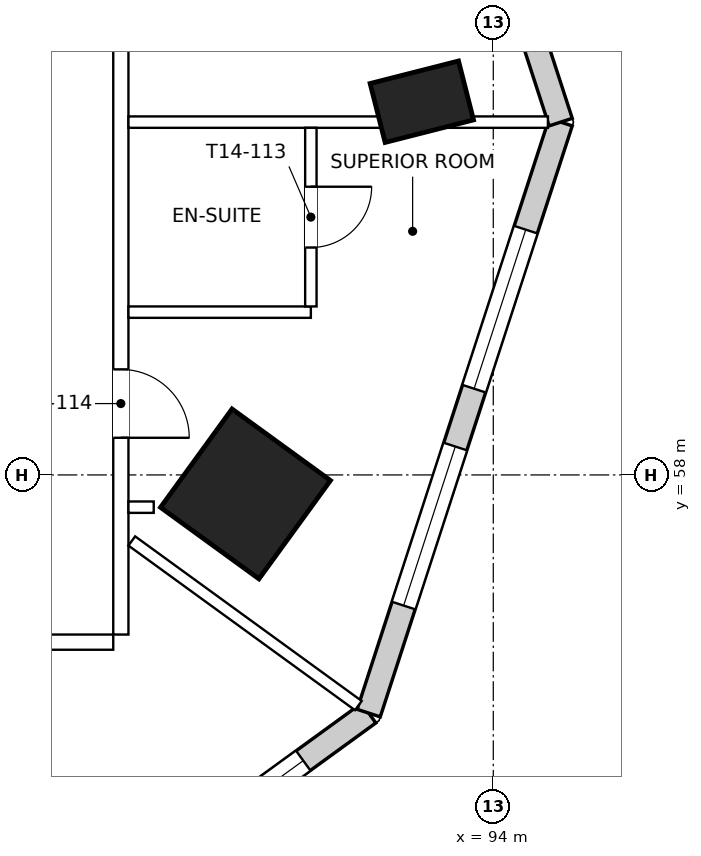
"""IFC4 building model, lengths in metres.
Left out: names, types, materials, properties, quantities, classifications, styles, units other than length and angle.
Written with IfcOpenShell. Run it as: python <this file> out.ifc"""

import sys

from ifc_helpers import new_model, si_unit, direction, frame, frame_2d, origin, origin_2d, place, context, subcontext, project, spatial, rectangle, extrude, element, fill, save


model = new_model("IFC4")
c1 = context("Model", 3, precision=1e-05, world=origin(), true_north=direction((0.0, 1.0)))
c2 = subcontext(c1, "Body", "Model", "MODEL_VIEW")
j1 = project(units=[si_unit("LENGTHUNIT", "METRE"), si_unit("PLANEANGLEUNIT", "RADIAN")], contexts=[c1])
p1 = place(None, origin())
s1 = spatial("IfcSite", under=j1, at=p1, CompositionType="ELEMENT")
p2 = place(p1, origin())
s2 = spatial("IfcBuilding", under=s1, at=p2, CompositionType="ELEMENT")
p3 = place(p2, frame((0.0, 0.0, 204.3)))
s3 = spatial("IfcBuildingStorey", under=s2, at=p3, CompositionType="ELEMENT", Elevation=204.3)
p4 = place(p3, frame((90.74, 57.75, 0.0), z_axis=(0.0, 0.0, 1.0), x_axis=(0.809016994375, -0.587785252292, 0.0)))
e1 = element("IfcColumn", 1, at=p4, inside=s3, PredefinedType="COLUMN", context=c2, shape_type="SweptSolid", body=[
    extrude(rectangle(XDim=1.6, YDim=1.6, at=origin_2d()), origin(), (0.0, 0.0, 1.0), 3.9),
])
p5 = place(p3, frame((93.06, 62.91, 0.0), z_axis=(0.0, 0.0, 1.0), x_axis=(0.246880623275, -0.969045900797, 0.0)))
e2 = element("IfcColumn", 2, at=p5, inside=s3, PredefinedType="COLUMN", context=c2, shape_type="SweptSolid", body=[
    extrude(rectangle(XDim=0.8, YDim=1.2, at=origin_2d()), origin(), (0.0, 0.0, 1.0), 3.9),
])
p6 = place(p3, frame((74.378, 41.801, 0.0), z_axis=(0.0, 0.0, 1.0), x_axis=(0.809017634756, 0.587784370883, 0.0)))
e3 = element("IfcWall", 3, at=p6, inside=s3, PredefinedType="SOLIDWALL", context=c2, shape_type="SweptSolid", body=[
    extrude(rectangle(XDim=22.229, YDim=0.32, at=frame_2d((11.114, 0.0))), origin(), (0.0, 0.0, 1.0), 3.6),
])
p7 = place(p6, frame((1.064, 0.0, 0.75)))
e4 = element("IfcOpeningElement", 4, at=p7, cuts=e3, PredefinedType="OPENING", context=c2, shape_type="SweptSolid", body=[
    extrude(rectangle(XDim=2.1, YDim=2.1, at=frame_2d((1.05, 1.05))), frame((0.0, 0.17, 0.0), z_axis=(0.0, -1.0, 0.0), x_axis=(1.0, 0.0, 0.0)), (0.0, 0.0, 1.0), 0.34),
])
p8 = place(p6, frame((4.064, 0.0, 0.75)))
e5 = element("IfcOpeningElement", 5, at=p8, cuts=e3, PredefinedType="OPENING", context=c2, shape_type="SweptSolid", body=[
    extrude(rectangle(XDim=2.1, YDim=2.1, at=frame_2d((1.05, 1.05))), frame((0.0, 0.17, 0.0), z_axis=(0.0, -1.0, 0.0), x_axis=(1.0, 0.0, 0.0)), (0.0, 0.0, 1.0), 0.34),
])
p9 = place(p6, frame((7.064, 0.0, 0.75)))
e6 = element("IfcOpeningElement", 6, at=p9, cuts=e3, PredefinedType="OPENING", context=c2, shape_type="SweptSolid", body=[
    extrude(rectangle(XDim=2.1, YDim=2.1, at=frame_2d((1.05, 1.05))), frame((0.0, 0.17, 0.0), z_axis=(0.0, -1.0, 0.0), x_axis=(1.0, 0.0, 0.0)), (0.0, 0.0, 1.0), 0.34),
])
p10 = place(p6, frame((10.064, 0.0, 0.75)))
e7 = element("IfcOpeningElement", 7, at=p10, cuts=e3, PredefinedType="OPENING", context=c2, shape_type="SweptSolid", body=[
    extrude(rectangle(XDim=2.1, YDim=2.1, at=frame_2d((1.05, 1.05))), frame((0.0, 0.17, 0.0), z_axis=(0.0, -1.0, 0.0), x_axis=(1.0, 0.0, 0.0)), (0.0, 0.0, 1.0), 0.34),
])
p11 = place(p6, frame((13.064, 0.0, 0.75)))
e8 = element("IfcOpeningElement", 8, at=p11, cuts=e3, PredefinedType="OPENING", context=c2, shape_type="SweptSolid", body=[
    extrude(rectangle(XDim=2.1, YDim=2.1, at=frame_2d((1.05, 1.05))), frame((0.0, 0.17, 0.0), z_axis=(0.0, -1.0, 0.0), x_axis=(1.0, 0.0, 0.0)), (0.0, 0.0, 1.0), 0.34),
])
p12 = place(p6, frame((16.064, 0.0, 0.75)))
e9 = element("IfcOpeningElement", 9, at=p12, cuts=e3, PredefinedType="OPENING", context=c2, shape_type="SweptSolid", body=[
    extrude(rectangle(XDim=2.1, YDim=2.1, at=frame_2d((1.05, 1.05))), frame((0.0, 0.17, 0.0), z_axis=(0.0, -1.0, 0.0), x_axis=(1.0, 0.0, 0.0)), (0.0, 0.0, 1.0), 0.34),
])
p13 = place(p6, frame((19.064, 0.0, 0.75)))
e10 = element("IfcOpeningElement", 10, at=p13, cuts=e3, PredefinedType="OPENING", context=c2, shape_type="SweptSolid", body=[
    extrude(rectangle(XDim=2.1, YDim=2.1, at=frame_2d((1.05, 1.05))), frame((0.0, 0.17, 0.0), z_axis=(0.0, -1.0, 0.0), x_axis=(1.0, 0.0, 0.0)), (0.0, 0.0, 1.0), 0.34),
])
p14 = place(p3, frame((92.361, 54.867, 0.0), z_axis=(0.0, 0.0, 1.0), x_axis=(0.309006387978, 0.951059962457, 0.0)))
e11 = element("IfcWall", 11, at=p14, inside=s3, PredefinedType="SOLIDWALL", context=c2, shape_type="SweptSolid", body=[
    extrude(rectangle(XDim=8.175, YDim=0.32, at=frame_2d((4.087, 0.0))), origin(), (0.0, 0.0, 1.0), 3.6),
])
p15 = place(p14, frame((1.488, 0.0, 0.75)))
e12 = element("IfcOpeningElement", 12, at=p15, cuts=e11, PredefinedType="OPENING", context=c2, shape_type="SweptSolid", body=[
    extrude(rectangle(XDim=2.2, YDim=2.1, at=frame_2d((1.1, 1.05))), frame((0.0, 0.17, 0.0), z_axis=(0.0, -1.0, 0.0), x_axis=(1.0, 0.0, 0.0)), (0.0, 0.0, 1.0), 0.34),
])
p16 = place(p14, frame((4.488, 0.0, 0.75)))
e13 = element("IfcOpeningElement", 13, at=p16, cuts=e11, PredefinedType="OPENING", context=c2, shape_type="SweptSolid", body=[
    extrude(rectangle(XDim=2.2, YDim=2.1, at=frame_2d((1.1, 1.05))), frame((0.0, 0.17, 0.0), z_axis=(0.0, -1.0, 0.0), x_axis=(1.0, 0.0, 0.0)), (0.0, 0.0, 1.0), 0.34),
])
p17 = place(p3, frame((94.887, 62.642, 0.0), z_axis=(0.0, 0.0, 1.0), x_axis=(-0.309019087741, 0.951055836117, 0.0)))
e14 = element("IfcWall", 14, at=p17, inside=s3, PredefinedType="SOLIDWALL", context=c2, shape_type="SweptSolid", body=[
    extrude(rectangle(XDim=21.18, YDim=0.32, at=frame_2d((10.59, 0.0))), origin(), (0.0, 0.0, 1.0), 3.6),
])
p18 = place(p17, frame((2.04, 0.0, 0.75)))
e15 = element("IfcOpeningElement", 15, at=p18, cuts=e14, PredefinedType="OPENING", context=c2, shape_type="SweptSolid", body=[
    extrude(rectangle(XDim=2.1, YDim=2.1, at=frame_2d((1.05, 1.05))), frame((0.0, 0.17, 0.0), z_axis=(0.0, -1.0, 0.0), x_axis=(1.0, 0.0, 0.0)), (0.0, 0.0, 1.0), 0.34),
])
p19 = place(p17, frame((5.04, 0.0, 0.75)))
e16 = element("IfcOpeningElement", 16, at=p19, cuts=e14, PredefinedType="OPENING", context=c2, shape_type="SweptSolid", body=[
    extrude(rectangle(XDim=2.1, YDim=2.1, at=frame_2d((1.05, 1.05))), frame((0.0, 0.17, 0.0), z_axis=(0.0, -1.0, 0.0), x_axis=(1.0, 0.0, 0.0)), (0.0, 0.0, 1.0), 0.34),
])
p20 = place(p17, frame((8.14, 0.0, 0.75)))
e17 = element("IfcOpeningElement", 17, at=p20, cuts=e14, PredefinedType="OPENING", context=c2, shape_type="SweptSolid", body=[
    extrude(rectangle(XDim=2.1, YDim=2.1, at=frame_2d((1.05, 1.05))), frame((0.0, 0.17, 0.0), z_axis=(0.0, -1.0, 0.0), x_axis=(1.0, 0.0, 0.0)), (0.0, 0.0, 1.0), 0.34),
])
p21 = place(p17, frame((11.19, 0.0, 0.9)))
e18 = element("IfcOpeningElement", 18, at=p21, cuts=e14, PredefinedType="OPENING", context=c2, shape_type="SweptSolid", body=[
    extrude(rectangle(XDim=1.6, YDim=1.8, at=frame_2d((0.8, 0.9))), frame((0.0, 0.17, 0.0), z_axis=(0.0, -1.0, 0.0), x_axis=(1.0, 0.0, 0.0)), (0.0, 0.0, 1.0), 0.34),
])
p22 = place(p17, frame((14.04, 0.0, 0.75)))
e19 = element("IfcOpeningElement", 19, at=p22, cuts=e14, PredefinedType="OPENING", context=c2, shape_type="SweptSolid", body=[
    extrude(rectangle(XDim=2.1, YDim=2.1, at=frame_2d((1.05, 1.05))), frame((0.0, 0.17, 0.0), z_axis=(0.0, -1.0, 0.0), x_axis=(1.0, 0.0, 0.0)), (0.0, 0.0, 1.0), 0.34),
])
p23 = place(p17, frame((17.04, 0.0, 0.75)))
e20 = element("IfcOpeningElement", 20, at=p23, cuts=e14, PredefinedType="OPENING", context=c2, shape_type="SweptSolid", body=[
    extrude(rectangle(XDim=2.1, YDim=2.1, at=frame_2d((1.05, 1.05))), frame((0.0, 0.17, 0.0), z_axis=(0.0, -1.0, 0.0), x_axis=(1.0, 0.0, 0.0)), (0.0, 0.0, 1.0), 0.34),
])
p24 = place(p3, frame((89.1, 63.85, 0.0), z_axis=(0.0, 0.0, 1.0), x_axis=(0.0, -1.0, 0.0)))
e21 = element("IfcWall", 21, at=p24, inside=s3, PredefinedType="PARTITIONING", context=c2, shape_type="SweptSolid", body=[
    extrude(rectangle(XDim=7.95, YDim=0.2, at=frame_2d((3.975, 0.0))), origin(), (0.0, 0.0, 1.0), 2.9),
])
p25 = place(p24, frame((4.461, 0.0, 0.0)))
e22 = element("IfcOpeningElement", 22, at=p25, cuts=e21, PredefinedType="OPENING", context=c2, shape_type="SweptSolid", body=[
    extrude(rectangle(XDim=0.9, YDim=2.1, at=frame_2d((0.45, 1.05))), frame((0.0, 0.11, 0.0), z_axis=(0.0, -1.0, 0.0), x_axis=(1.0, 0.0, 0.0)), (0.0, 0.0, 1.0), 0.22),
])
p26 = place(p3, frame((89.0, 55.8, 0.0), z_axis=(0.0, 0.0, 1.0), x_axis=(-1.0, 0.0, 0.0)))
e23 = element("IfcWall", 23, at=p26, inside=s3, PredefinedType="PARTITIONING", context=c2, shape_type="SweptSolid", body=[
    extrude(rectangle(XDim=11.382, YDim=0.2, at=frame_2d((5.691, 0.0))), origin(), (0.0, 0.0, 1.0), 2.9),
])
p27 = place(p26, frame((9.204, 0.0, 0.0)))
e24 = element("IfcOpeningElement", 24, at=p27, cuts=e23, PredefinedType="OPENING", context=c2, shape_type="SweptSolid", body=[
    extrude(rectangle(XDim=0.9, YDim=2.1, at=frame_2d((0.45, 1.05))), frame((0.0, 0.11, 0.0), z_axis=(0.0, -1.0, 0.0), x_axis=(1.0, 0.0, 0.0)), (0.0, 0.0, 1.0), 0.22),
])
p28 = place(p26, frame((3.546, 0.0, 0.0)))
e25 = element("IfcOpeningElement", 25, at=p28, cuts=e23, PredefinedType="OPENING", context=c2, shape_type="SweptSolid", body=[
    extrude(rectangle(XDim=0.9, YDim=2.1, at=frame_2d((0.45, 1.05))), frame((0.0, 0.11, 0.0), z_axis=(0.0, -1.0, 0.0), x_axis=(1.0, 0.0, 0.0)), (0.0, 0.0, 1.0), 0.22),
])
p29 = place(p3, frame((92.225, 54.966, 0.0), z_axis=(0.0, 0.0, 1.0), x_axis=(-0.809028266422, 0.587769737338, 0.0)))
e26 = element("IfcWall", 26, at=p29, inside=s3, PredefinedType="PARTITIONING", context=c2, shape_type="SweptSolid", body=[
    extrude(rectangle(XDim=3.684, YDim=0.15, at=frame_2d((1.842, 0.0))), origin(), (0.0, 0.0, 1.0), 2.9),
])
p30 = place(p3, frame((94.719, 62.642, 0.0), z_axis=(0.0, 0.0, 1.0), x_axis=(-1.0, 0.0, 0.0)))
e27 = element("IfcWall", 27, at=p30, inside=s3, PredefinedType="PARTITIONING", context=c2, shape_type="SweptSolid", body=[
    extrude(rectangle(XDim=5.519, YDim=0.15, at=frame_2d((2.76, 0.0))), origin(), (0.0, 0.0, 1.0), 3.6),
])
p31 = place(p3, frame((89.2, 60.142, 0.0), z_axis=(0.0, 0.0, 1.0), x_axis=(1.0, 0.0, 0.0)))
e28 = element("IfcWall", 28, at=p31, inside=s3, PredefinedType="PARTITIONING", context=c2, shape_type="SweptSolid", body=[
    extrude(rectangle(XDim=2.4, YDim=0.15, at=frame_2d((1.2, 0.0))), origin(), (0.0, 0.0, 1.0), 3.6),
])
p32 = place(p3, frame((91.6, 62.567, 0.0), z_axis=(0.0, 0.0, 1.0), x_axis=(0.0, -1.0, 0.0)))
e29 = element("IfcWall", 29, at=p32, inside=s3, PredefinedType="PARTITIONING", context=c2, shape_type="SweptSolid", body=[
    extrude(rectangle(XDim=2.35, YDim=0.15, at=frame_2d((1.175, 0.0))), origin(), (0.0, 0.0, 1.0), 3.6),
])
p33 = place(p32, frame((0.775, 0.0, 0.0)))
e30 = element("IfcOpeningElement", 30, at=p33, cuts=e29, PredefinedType="OPENING", context=c2, shape_type="SweptSolid", body=[
    extrude(rectangle(XDim=0.8, YDim=2.1, at=frame_2d((0.4, 1.05))), frame((0.0, 0.085, 0.0), z_axis=(0.0, -1.0, 0.0), x_axis=(1.0, 0.0, 0.0)), (0.0, 0.0, 1.0), 0.17),
])
p34 = place(p3, frame((89.533, 57.576, 0.0), z_axis=(0.0, 0.0, 1.0), x_axis=(-1.0, 0.0, 0.0)))
e31 = element("IfcWall", 31, at=p34, inside=s3, PredefinedType="PARTITIONING", context=c2, shape_type="SweptSolid", body=[
    extrude(rectangle(XDim=0.333, YDim=0.15, at=frame_2d((0.167, 0.0))), origin(), (0.0, 0.0, 1.0), 3.6),
])
p35 = place(p13, origin())
e32 = element("IfcWindow", 32, at=p35, inside=s3, PartitioningType="SINGLE_PANEL", PredefinedType="WINDOW", context=c2, shape_type="SweptSolid", body=[
    extrude(rectangle(XDim=2.1, YDim=2.1, at=frame_2d((1.05, 1.05))), frame((0.0, 0.07, 0.0), z_axis=(0.0, -1.0, 0.0), x_axis=(1.0, 0.0, 0.0)), (0.0, 0.0, 1.0), 0.06),
])
fill(e10, e32)
p36 = place(p15, origin())
e33 = element("IfcWindow", 33, at=p36, inside=s3, PartitioningType="SINGLE_PANEL", PredefinedType="WINDOW", context=c2, shape_type="SweptSolid", body=[
    extrude(rectangle(XDim=2.2, YDim=2.1, at=frame_2d((1.1, 1.05))), frame((0.0, 0.07, 0.0), z_axis=(0.0, -1.0, 0.0), x_axis=(1.0, 0.0, 0.0)), (0.0, 0.0, 1.0), 0.06),
])
fill(e12, e33)
p37 = place(p16, origin())
e34 = element("IfcWindow", 34, at=p37, inside=s3, PartitioningType="SINGLE_PANEL", PredefinedType="WINDOW", context=c2, shape_type="SweptSolid", body=[
    extrude(rectangle(XDim=2.2, YDim=2.1, at=frame_2d((1.1, 1.05))), frame((0.0, 0.07, 0.0), z_axis=(0.0, -1.0, 0.0), x_axis=(1.0, 0.0, 0.0)), (0.0, 0.0, 1.0), 0.06),
])
fill(e13, e34)
p38 = place(p33, origin())
e35 = element("IfcDoor", 35, at=p38, inside=s3, OperationType="SINGLE_SWING_LEFT", PredefinedType="DOOR", context=c2, shape_type="SweptSolid", body=[
    extrude(rectangle(XDim=0.8, YDim=2.1, at=frame_2d((0.4, 1.05))), frame((0.0, 0.025, 0.0), z_axis=(0.0, -1.0, 0.0), x_axis=(1.0, 0.0, 0.0)), (0.0, 0.0, 1.0), 0.05),
])
fill(e30, e35)
p39 = place(p25, origin())
e36 = element("IfcDoor", 36, at=p39, inside=s3, OperationType="SINGLE_SWING_RIGHT", PredefinedType="DOOR", context=c2, shape_type="SweptSolid", body=[
    extrude(rectangle(XDim=0.9, YDim=2.1, at=frame_2d((0.45, 1.05))), frame((0.0, 0.025, 0.0), z_axis=(0.0, -1.0, 0.0), x_axis=(1.0, 0.0, 0.0)), (0.0, 0.0, 1.0), 0.05),
])
fill(e22, e36)
save(model, sys.argv[1])
